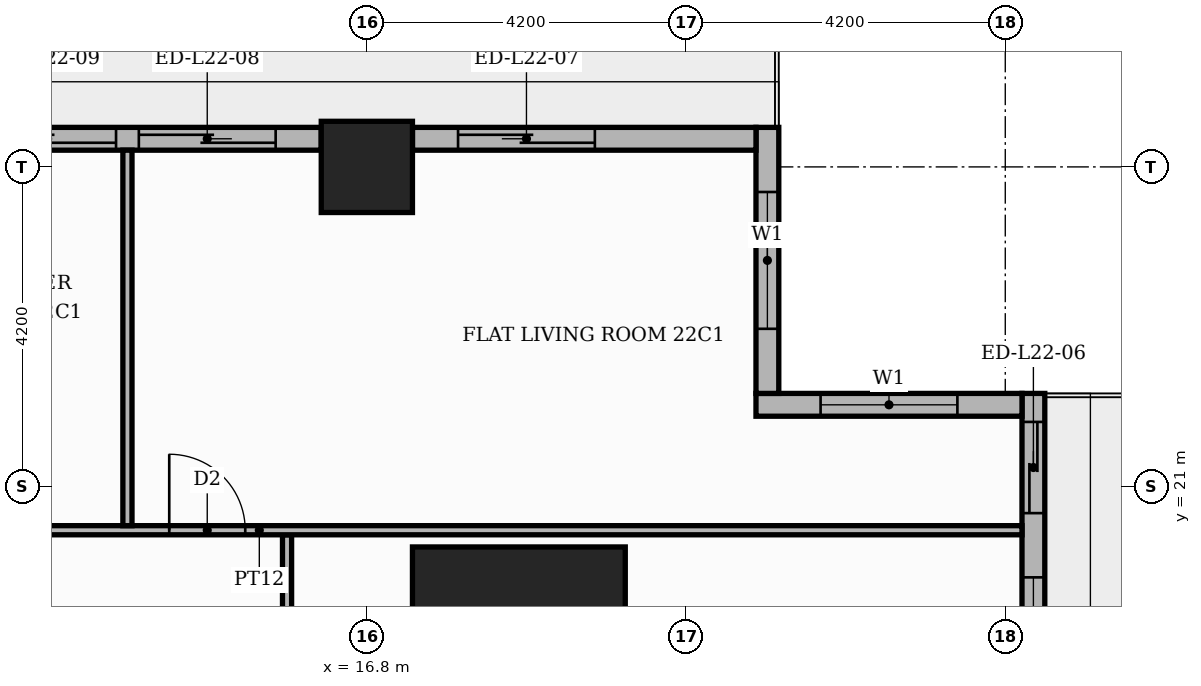
"""IFC4 building model, lengths in metres.
Left out: names, types, materials, properties, quantities, classifications, styles, units other than length and angle.
Written with IfcOpenShell. Run it as: python <this file> out.ifc"""

import sys

from ifc_helpers import new_model, si_unit, direction, frame, frame_2d, origin, origin_2d, place, context, subcontext, project, spatial, rectangle, extrude, element, fill, save


model = new_model("IFC4")
c1 = context("Model", 3, precision=1e-05, world=origin(), true_north=direction((0.0, 1.0)))
c2 = subcontext(c1, "Body", "Model", "MODEL_VIEW")
j1 = project(units=[si_unit("LENGTHUNIT", "METRE"), si_unit("PLANEANGLEUNIT", "RADIAN")], contexts=[c1])
p1 = place(None, origin())
s1 = spatial("IfcSite", under=j1, at=p1, CompositionType="ELEMENT")
p2 = place(p1, origin())
s2 = spatial("IfcBuilding", under=s1, at=p2, CompositionType="ELEMENT")
p3 = place(p2, frame((0.0, 0.0, 94.8)))
s3 = spatial("IfcBuildingStorey", under=s2, at=p3, CompositionType="ELEMENT", Elevation=94.8)
p4 = place(p3, frame((18.8, 18.8, 0.0), z_axis=(0.0, 0.0, 1.0), x_axis=(1.0, 0.0, 0.0)))
e1 = element("IfcColumn", 1, at=p4, inside=s3, PredefinedType="COLUMN", context=c2, shape_type="SweptSolid", body=[
    extrude(rectangle(XDim=2.8, YDim=2.8, at=origin_2d()), origin(), (0.0, 0.0, 1.0), 3.9),
])
p5 = place(p3, frame((16.8, 25.2, 0.0), z_axis=(0.0, 0.0, 1.0), x_axis=(1.0, 0.0, 0.0)))
e2 = element("IfcColumn", 2, at=p5, inside=s3, PredefinedType="COLUMN", context=c2, shape_type="SweptSolid", body=[
    extrude(rectangle(XDim=1.2, YDim=1.2, at=origin_2d()), origin(), (0.0, 0.0, 1.0), 3.9),
])
p6 = place(p3, frame((25.57, 17.4, 0.0), z_axis=(0.0, 0.0, 1.0), x_axis=(0.0, 1.0, 0.0)))
e3 = element("IfcWall", 3, at=p6, inside=s3, PredefinedType="STANDARD", context=c2, shape_type="SweptSolid", body=[
    extrude(rectangle(XDim=4.82, YDim=0.3, at=frame_2d((2.41, 0.0))), origin(), (0.0, 0.0, 1.0), 3.48),
])
p7 = place(p6, frame((0.6, 0.0, 0.9)))
e4 = element("IfcOpeningElement", 4, at=p7, cuts=e3, PredefinedType="OPENING", context=c2, shape_type="SweptSolid", body=[
    extrude(rectangle(XDim=1.8, YDim=2.1, at=frame_2d((0.9, 1.05))), frame((0.0, 0.16, 0.0), z_axis=(0.0, -1.0, 0.0), x_axis=(1.0, 0.0, 0.0)), (0.0, 0.0, 1.0), 0.32),
])
p8 = place(p6, frame((3.245, 0.0, 0.0)))
e5 = element("IfcOpeningElement", 5, at=p8, cuts=e3, PredefinedType="OPENING", context=c2, shape_type="SweptSolid", body=[
    extrude(rectangle(XDim=1.2, YDim=2.4, at=frame_2d((0.6, 1.2))), frame((0.0, 0.16, 0.0), z_axis=(0.0, -1.0, 0.0), x_axis=(1.0, 0.0, 0.0)), (0.0, 0.0, 1.0), 0.32),
])
p9 = place(p3, frame((25.42, 22.07, 0.0), z_axis=(0.0, 0.0, 1.0), x_axis=(-1.0, 0.0, 0.0)))
e6 = element("IfcWall", 6, at=p9, inside=s3, PredefinedType="STANDARD", context=c2, shape_type="SweptSolid", body=[
    extrude(rectangle(XDim=3.5, YDim=0.3, at=frame_2d((1.75, 0.0))), origin(), (0.0, 0.0, 1.0), 3.48),
])
p10 = place(p9, frame((0.85, 0.0, 0.9)))
e7 = element("IfcOpeningElement", 7, at=p10, cuts=e6, PredefinedType="OPENING", context=c2, shape_type="SweptSolid", body=[
    extrude(rectangle(XDim=1.8, YDim=2.1, at=frame_2d((0.9, 1.05))), frame((0.0, 0.16, 0.0), z_axis=(0.0, -1.0, 0.0), x_axis=(1.0, 0.0, 0.0)), (0.0, 0.0, 1.0), 0.32),
])
p11 = place(p3, frame((22.07, 22.22, 0.0), z_axis=(0.0, 0.0, 1.0), x_axis=(0.0, 1.0, 0.0)))
e8 = element("IfcWall", 8, at=p11, inside=s3, PredefinedType="STANDARD", context=c2, shape_type="SweptSolid", body=[
    extrude(rectangle(XDim=3.5, YDim=0.3, at=frame_2d((1.75, 0.0))), origin(), (0.0, 0.0, 1.0), 3.48),
])
p12 = place(p11, frame((0.85, 0.0, 0.9)))
e9 = element("IfcOpeningElement", 9, at=p12, cuts=e8, PredefinedType="OPENING", context=c2, shape_type="SweptSolid", body=[
    extrude(rectangle(XDim=1.8, YDim=2.1, at=frame_2d((0.9, 1.05))), frame((0.0, 0.16, 0.0), z_axis=(0.0, -1.0, 0.0), x_axis=(1.0, 0.0, 0.0)), (0.0, 0.0, 1.0), 0.32),
])
p13 = place(p3, frame((21.92, 25.57, 0.0), z_axis=(0.0, 0.0, 1.0), x_axis=(-1.0, 0.0, 0.0)))
e10 = element("IfcWall", 10, at=p13, inside=s3, PredefinedType="STANDARD", context=c2, shape_type="SweptSolid", body=[
    extrude(rectangle(XDim=4.52, YDim=0.3, at=frame_2d((2.26, 0.0))), origin(), (0.0, 0.0, 1.0), 3.48),
])
p14 = place(p13, frame((2.12, 0.0, 0.0)))
e11 = element("IfcOpeningElement", 11, at=p14, cuts=e10, PredefinedType="OPENING", context=c2, shape_type="SweptSolid", body=[
    extrude(rectangle(XDim=1.8, YDim=2.4, at=frame_2d((0.9, 1.2))), frame((0.0, 0.16, 0.0), z_axis=(0.0, -1.0, 0.0), x_axis=(1.0, 0.0, 0.0)), (0.0, 0.0, 1.0), 0.32),
])
p15 = place(p3, frame((16.2, 25.57, 0.0), z_axis=(0.0, 0.0, 1.0), x_axis=(-1.0, 0.0, 0.0)))
e12 = element("IfcWall", 12, at=p15, inside=s3, PredefinedType="STANDARD", context=c2, shape_type="SweptSolid", body=[
    extrude(rectangle(XDim=7.2, YDim=0.3, at=frame_2d((3.6, 0.0))), origin(), (0.0, 0.0, 1.0), 3.48),
])
p16 = place(p15, frame((0.6, 0.0, 0.0)))
e13 = element("IfcOpeningElement", 13, at=p16, cuts=e12, PredefinedType="OPENING", context=c2, shape_type="SweptSolid", body=[
    extrude(rectangle(XDim=1.8, YDim=2.4, at=frame_2d((0.9, 1.2))), frame((0.0, 0.16, 0.0), z_axis=(0.0, -1.0, 0.0), x_axis=(1.0, 0.0, 0.0)), (0.0, 0.0, 1.0), 0.32),
])
p17 = place(p15, frame((2.7, 0.0, 0.0)))
e14 = element("IfcOpeningElement", 14, at=p17, cuts=e12, PredefinedType="OPENING", context=c2, shape_type="SweptSolid", body=[
    extrude(rectangle(XDim=1.8, YDim=2.4, at=frame_2d((0.9, 1.2))), frame((0.0, 0.16, 0.0), z_axis=(0.0, -1.0, 0.0), x_axis=(1.0, 0.0, 0.0)), (0.0, 0.0, 1.0), 0.32),
])
p18 = place(p15, frame((4.8, 0.0, 0.9)))
e15 = element("IfcOpeningElement", 15, at=p18, cuts=e12, PredefinedType="OPENING", context=c2, shape_type="SweptSolid", body=[
    extrude(rectangle(XDim=1.8, YDim=2.1, at=frame_2d((0.9, 1.05))), frame((0.0, 0.16, 0.0), z_axis=(0.0, -1.0, 0.0), x_axis=(1.0, 0.0, 0.0)), (0.0, 0.0, 1.0), 0.32),
])
p19 = place(p3, frame((15.75, 13.75, 0.0), z_axis=(0.0, 0.0, 1.0), x_axis=(0.0, 1.0, 0.0)))
e16 = element("IfcWall", 16, at=p19, inside=s3, PredefinedType="PARTITIONING", context=c2, shape_type="SweptSolid", body=[
    extrude(rectangle(XDim=6.61, YDim=0.12, at=frame_2d((3.305, 0.0))), origin(), (0.0, 0.0, 1.0), 3.48),
])
p20 = place(p19, frame((2.785, 0.0, 0.0)))
e17 = element("IfcOpeningElement", 17, at=p20, cuts=e16, PredefinedType="OPENING", context=c2, shape_type="SweptSolid", body=[
    extrude(rectangle(XDim=1.0, YDim=2.1, at=frame_2d((0.5, 1.05))), frame((0.0, 0.07, 0.0), z_axis=(0.0, -1.0, 0.0), x_axis=(1.0, 0.0, 0.0)), (0.0, 0.0, 1.0), 0.14),
])
p21 = place(p3, frame((5.35, 20.42, 0.0), z_axis=(0.0, 0.0, 1.0), x_axis=(1.0, 0.0, 0.0)))
e18 = element("IfcWall", 18, at=p21, inside=s3, PredefinedType="PARTITIONING", context=c2, shape_type="SweptSolid", body=[
    extrude(rectangle(XDim=20.07, YDim=0.12, at=frame_2d((10.035, 0.0))), origin(), (0.0, 0.0, 1.0), 3.48),
])
p22 = place(p21, frame((8.85, 0.0, 0.0)))
e19 = element("IfcOpeningElement", 19, at=p22, cuts=e18, PredefinedType="OPENING", context=c2, shape_type="SweptSolid", body=[
    extrude(rectangle(XDim=1.0, YDim=2.1, at=frame_2d((0.5, 1.05))), frame((0.0, 0.07, 0.0), z_axis=(0.0, -1.0, 0.0), x_axis=(1.0, 0.0, 0.0)), (0.0, 0.0, 1.0), 0.14),
])
p23 = place(p21, frame((5.75, 0.0, 0.0)))
e20 = element("IfcOpeningElement", 20, at=p23, cuts=e18, PredefinedType="OPENING", context=c2, shape_type="SweptSolid", body=[
    extrude(rectangle(XDim=0.9, YDim=2.1, at=frame_2d((0.45, 1.05))), frame((0.0, 0.07, 0.0), z_axis=(0.0, -1.0, 0.0), x_axis=(1.0, 0.0, 0.0)), (0.0, 0.0, 1.0), 0.14),
])
p24 = place(p3, frame((13.65, 20.48, 0.0), z_axis=(0.0, 0.0, 1.0), x_axis=(0.0, 1.0, 0.0)))
e21 = element("IfcWall", 21, at=p24, inside=s3, PredefinedType="PARTITIONING", context=c2, shape_type="SweptSolid", body=[
    extrude(rectangle(XDim=4.94, YDim=0.12, at=frame_2d((2.47, 0.0))), origin(), (0.0, 0.0, 1.0), 3.48),
])
p25 = place(p7, origin())
e22 = element("IfcWindow", 22, at=p25, inside=s3, PartitioningType="SINGLE_PANEL", PredefinedType="WINDOW", context=c2, shape_type="SweptSolid", body=[
    extrude(rectangle(XDim=1.8, YDim=2.1, at=frame_2d((0.9, 1.05))), frame((0.0, 0.03, 0.0), z_axis=(0.0, -1.0, 0.0), x_axis=(1.0, 0.0, 0.0)), (0.0, 0.0, 1.0), 0.06),
])
fill(e4, e22)
p26 = place(p8, origin())
e23 = element("IfcDoor", 23, at=p26, inside=s3, OperationType="SLIDING_TO_RIGHT", PredefinedType="DOOR", context=c2, shape_type="SweptSolid", body=[
    extrude(rectangle(XDim=1.2, YDim=2.4, at=frame_2d((0.6, 1.2))), frame((0.0, 0.025, 0.0), z_axis=(0.0, -1.0, 0.0), x_axis=(1.0, 0.0, 0.0)), (0.0, 0.0, 1.0), 0.05),
])
fill(e5, e23)
p27 = place(p10, origin())
e24 = element("IfcWindow", 24, at=p27, inside=s3, PartitioningType="SINGLE_PANEL", PredefinedType="WINDOW", context=c2, shape_type="SweptSolid", body=[
    extrude(rectangle(XDim=1.8, YDim=2.1, at=frame_2d((0.9, 1.05))), frame((0.0, 0.03, 0.0), z_axis=(0.0, -1.0, 0.0), x_axis=(1.0, 0.0, 0.0)), (0.0, 0.0, 1.0), 0.06),
])
fill(e7, e24)
p28 = place(p12, origin())
e25 = element("IfcWindow", 25, at=p28, inside=s3, PartitioningType="SINGLE_PANEL", PredefinedType="WINDOW", context=c2, shape_type="SweptSolid", body=[
    extrude(rectangle(XDim=1.8, YDim=2.1, at=frame_2d((0.9, 1.05))), frame((0.0, 0.03, 0.0), z_axis=(0.0, -1.0, 0.0), x_axis=(1.0, 0.0, 0.0)), (0.0, 0.0, 1.0), 0.06),
])
fill(e9, e25)
p29 = place(p14, origin())
e26 = element("IfcDoor", 26, at=p29, inside=s3, OperationType="SLIDING_TO_RIGHT", PredefinedType="DOOR", context=c2, shape_type="SweptSolid", body=[
    extrude(rectangle(XDim=1.8, YDim=2.4, at=frame_2d((0.9, 1.2))), frame((0.0, 0.025, 0.0), z_axis=(0.0, -1.0, 0.0), x_axis=(1.0, 0.0, 0.0)), (0.0, 0.0, 1.0), 0.05),
])
fill(e11, e26)
p30 = place(p16, origin())
e27 = element("IfcDoor", 27, at=p30, inside=s3, OperationType="SLIDING_TO_LEFT", PredefinedType="DOOR", context=c2, shape_type="SweptSolid", body=[
    extrude(rectangle(XDim=1.8, YDim=2.4, at=frame_2d((0.9, 1.2))), frame((0.0, 0.025, 0.0), z_axis=(0.0, -1.0, 0.0), x_axis=(1.0, 0.0, 0.0)), (0.0, 0.0, 1.0), 0.05),
])
fill(e13, e27)
p31 = place(p17, origin())
e28 = element("IfcDoor", 28, at=p31, inside=s3, OperationType="SLIDING_TO_RIGHT", PredefinedType="DOOR", context=c2, shape_type="SweptSolid", body=[
    extrude(rectangle(XDim=1.8, YDim=2.4, at=frame_2d((0.9, 1.2))), frame((0.0, 0.025, 0.0), z_axis=(0.0, -1.0, 0.0), x_axis=(1.0, 0.0, 0.0)), (0.0, 0.0, 1.0), 0.05),
])
fill(e14, e28)
p32 = place(p22, origin())
e29 = element("IfcDoor", 29, at=p32, inside=s3, OperationType="SINGLE_SWING_LEFT", PredefinedType="DOOR", context=c2, shape_type="SweptSolid", body=[
    extrude(rectangle(XDim=1.0, YDim=2.1, at=frame_2d((0.5, 1.05))), frame((0.0, 0.025, 0.0), z_axis=(0.0, -1.0, 0.0), x_axis=(1.0, 0.0, 0.0)), (0.0, 0.0, 1.0), 0.05),
])
fill(e19, e29)
save(model, sys.argv[1])
